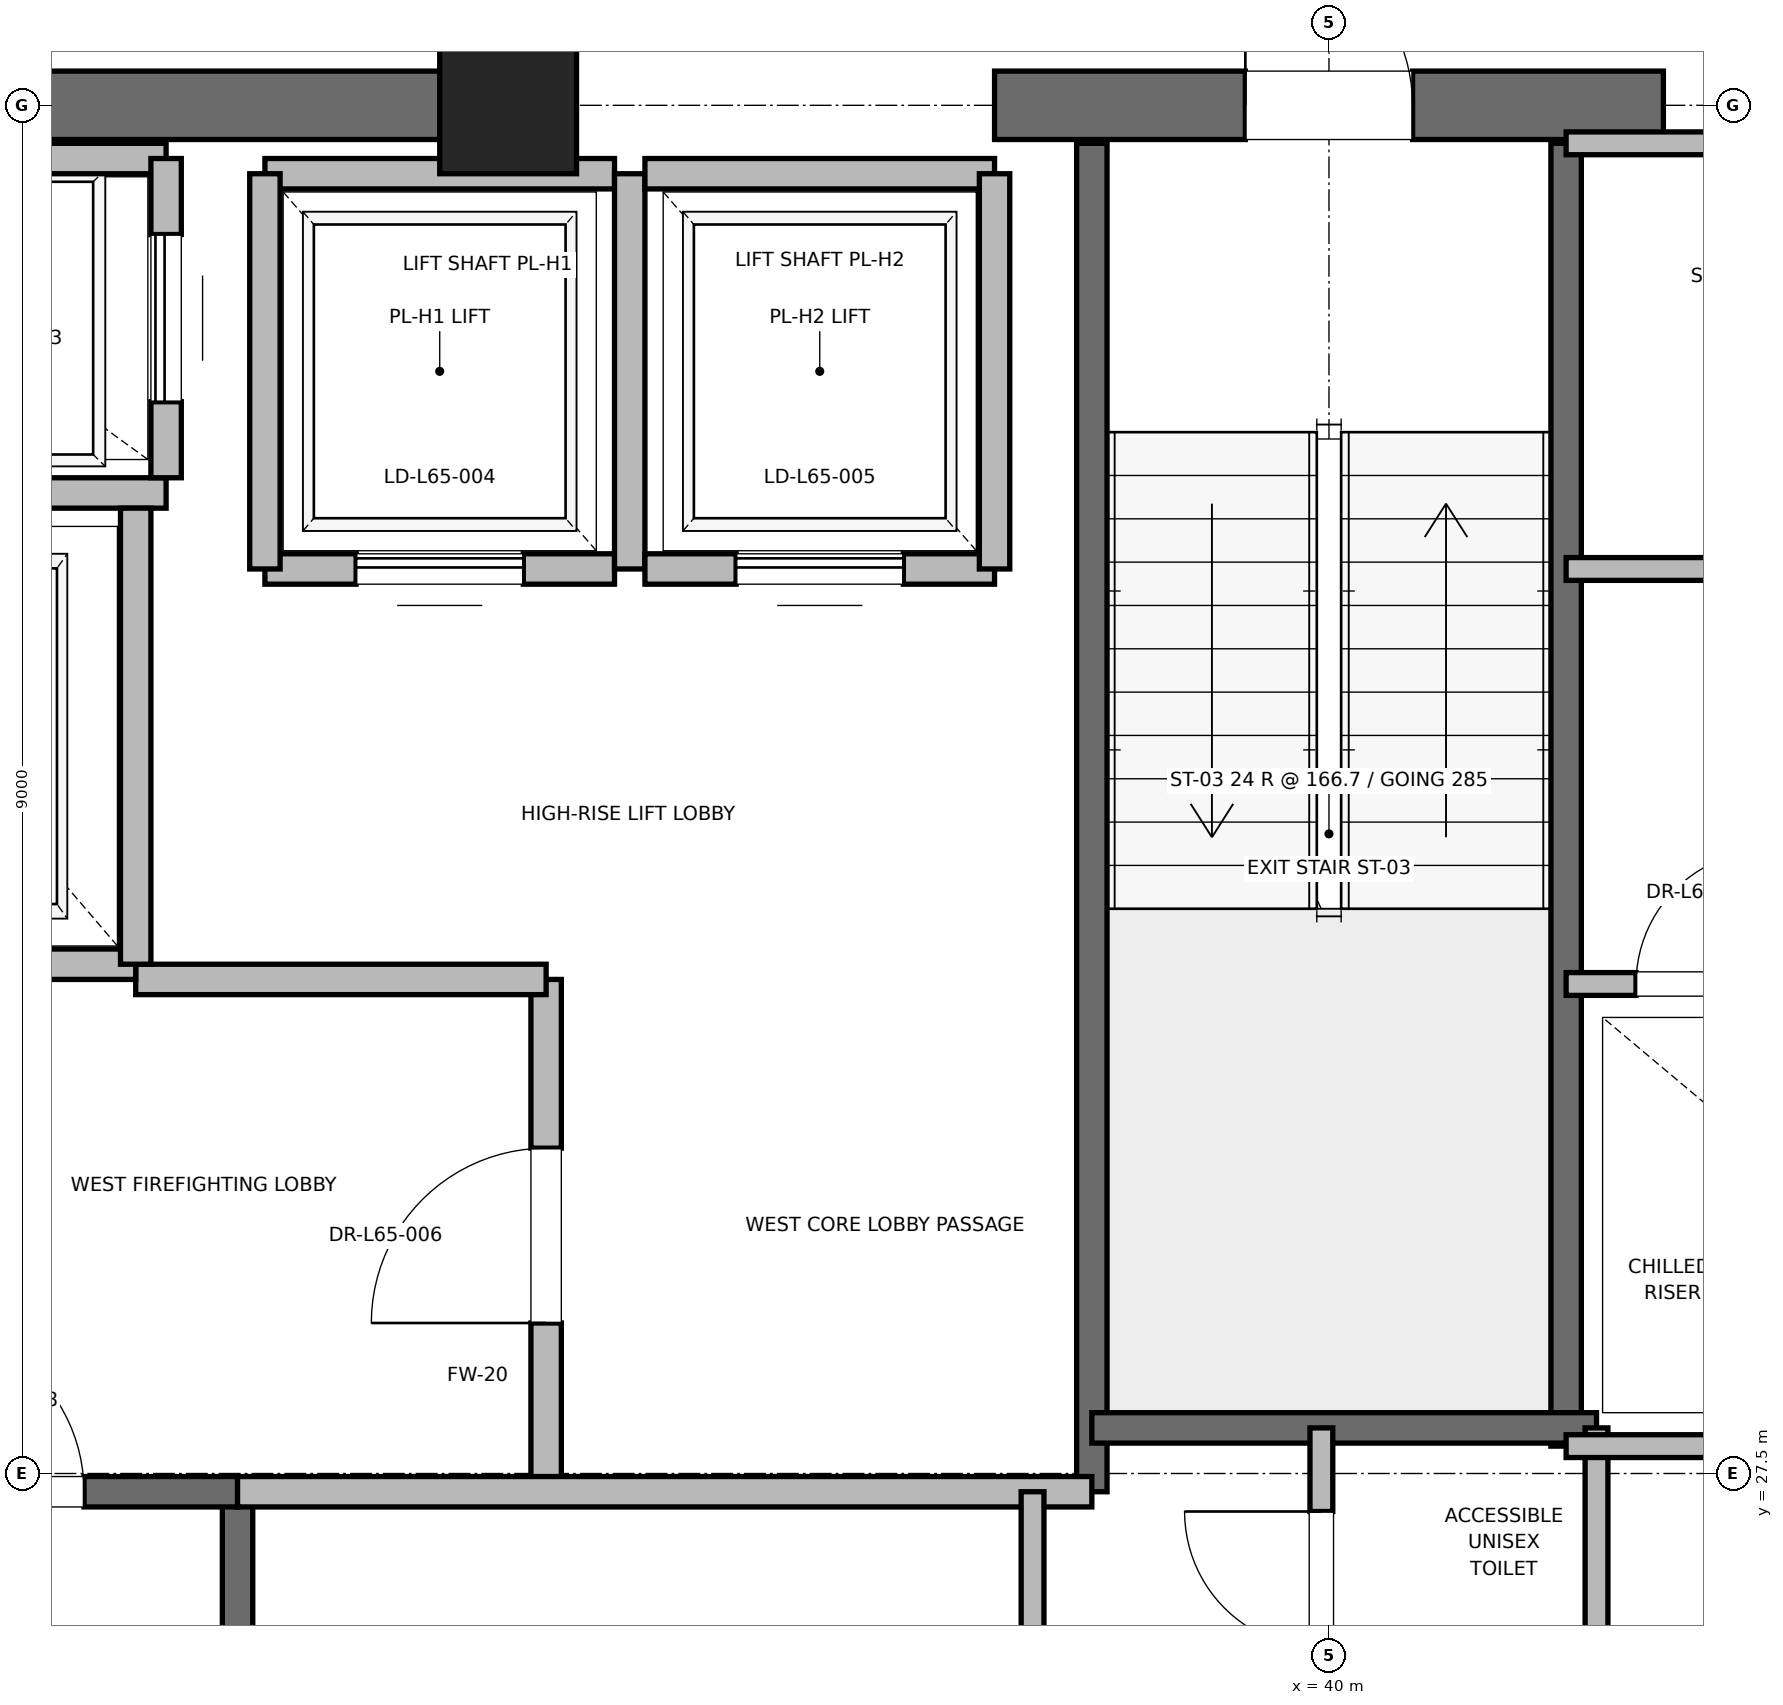
"""IFC4 building model, lengths in metres.
Left out: names, types, materials, properties, quantities, classifications, styles, units other than length and angle.
Written with IfcOpenShell. Run it as: python <this file> out.ifc"""

import sys

from ifc_helpers import new_model, si_unit, direction, frame, frame_2d, origin, origin_2d, place, context, subcontext, project, spatial, rectangle, extrude, element, fill, save


model = new_model("IFC4")
c1 = context("Model", 3, precision=1e-05, world=origin(), true_north=direction((0.0, 1.0)))
c2 = subcontext(c1, "Body", "Model", "MODEL_VIEW")
j1 = project(units=[si_unit("LENGTHUNIT", "METRE"), si_unit("PLANEANGLEUNIT", "RADIAN")], contexts=[c1])
p1 = place(None, origin())
s1 = spatial("IfcSite", under=j1, at=p1, CompositionType="ELEMENT")
p2 = place(p1, origin())
s2 = spatial("IfcBuilding", under=s1, at=p2, CompositionType="ELEMENT")
p3 = place(p2, frame((0.0, 0.0, 279.2)))
s3 = spatial("IfcBuildingStorey", under=s2, at=p3, CompositionType="ELEMENT", Elevation=279.2)
p4 = place(p3, frame((34.6, 36.5, 0.0), z_axis=(0.0, 0.0, 1.0), x_axis=(1.0, 0.0, 0.0)))
e1 = element("IfcColumn", 1, at=p4, inside=s3, PredefinedType="PILASTER", context=c2, shape_type="SweptSolid", body=[
    extrude(rectangle(XDim=0.9, YDim=0.9, at=origin_2d()), origin(), (0.0, 0.0, 1.0), 4.0),
])
p5 = place(p3, frame((29.0, 36.5, 0.0), z_axis=(0.0, 0.0, 1.0), x_axis=(1.0, 0.0, 0.0)))
e2 = element("IfcWall", 2, at=p5, inside=s3, PredefinedType="SHEAR", context=c2, shape_type="SweptSolid", body=[
    extrude(rectangle(XDim=5.8, YDim=0.45, at=frame_2d((2.9, 0.0))), origin(), (0.0, 0.0, 1.0), 3.785),
])
p6 = place(p3, frame((37.8, 36.5, 0.0), z_axis=(0.0, 0.0, 1.0), x_axis=(1.0, 0.0, 0.0)))
e3 = element("IfcWall", 3, at=p6, inside=s3, PredefinedType="SHEAR", context=c2, shape_type="SweptSolid", body=[
    extrude(rectangle(XDim=4.4, YDim=0.45, at=frame_2d((2.2, 0.0))), origin(), (0.0, 0.0, 1.0), 3.785),
])
p7 = place(p6, frame((1.65, 0.0, 0.0)))
e4 = element("IfcOpeningElement", 4, at=p7, cuts=e3, PredefinedType="OPENING", context=c2, shape_type="SweptSolid", body=[
    extrude(rectangle(XDim=1.1, YDim=2.15, at=frame_2d((0.55, 1.075))), frame((0.0, 0.225, 0.0), z_axis=(0.0, -1.0, 0.0), x_axis=(1.0, 0.0, 0.0)), (0.0, 0.0, 1.0), 0.45),
])
p8 = place(p3, frame((32.82, 18.6, 0.0), z_axis=(0.0, 0.0, 1.0), x_axis=(0.0, 1.0, 0.0)))
e5 = element("IfcWall", 5, at=p8, inside=s3, PredefinedType="SOLIDWALL", context=c2, shape_type="SweptSolid", body=[
    extrude(rectangle(XDim=8.78, YDim=0.2, at=frame_2d((4.39, 0.0))), origin(), (0.0, 0.0, 1.0), 3.785),
])
p9 = place(p3, frame((29.7, 27.38, 0.0), z_axis=(0.0, 0.0, 1.0), x_axis=(1.0, 0.0, 0.0)))
e6 = element("IfcWall", 6, at=p9, inside=s3, PredefinedType="SOLIDWALL", context=c2, shape_type="SweptSolid", body=[
    extrude(rectangle(XDim=3.12, YDim=0.2, at=frame_2d((1.56, 0.0))), origin(), (0.0, 0.0, 1.0), 3.785),
])
p10 = place(p9, frame((1.01, 0.0, 0.0)))
e7 = element("IfcOpeningElement", 7, at=p10, cuts=e6, PredefinedType="OPENING", context=c2, shape_type="SweptSolid", body=[
    extrude(rectangle(XDim=1.1, YDim=2.15, at=frame_2d((0.55, 1.075))), frame((0.0, 0.1, 0.0), z_axis=(0.0, -1.0, 0.0), x_axis=(1.0, 0.0, 0.0)), (0.0, 0.0, 1.0), 0.2),
])
p11 = place(p3, frame((38.44, 27.38, 0.0), z_axis=(0.0, 0.0, 1.0), x_axis=(0.0, 1.0, 0.0)))
e8 = element("IfcWall", 8, at=p11, inside=s3, PredefinedType="SOLIDWALL", context=c2, shape_type="SweptSolid", body=[
    extrude(rectangle(XDim=8.87, YDim=0.2, at=frame_2d((4.435, 0.0))), origin(), (0.0, 0.0, 1.0), 3.785),
])
p12 = place(p3, frame((41.56, 27.68, 0.0), z_axis=(0.0, 0.0, 1.0), x_axis=(0.0, 1.0, 0.0)))
e9 = element("IfcWall", 9, at=p12, inside=s3, PredefinedType="SOLIDWALL", context=c2, shape_type="SweptSolid", body=[
    extrude(rectangle(XDim=8.57, YDim=0.2, at=frame_2d((4.285, 0.0))), origin(), (0.0, 0.0, 1.0), 3.785),
])
p13 = place(p3, frame((38.44, 27.8, 0.0), z_axis=(0.0, 0.0, 1.0), x_axis=(1.0, 0.0, 0.0)))
e10 = element("IfcWall", 10, at=p13, inside=s3, PredefinedType="SOLIDWALL", context=c2, shape_type="SweptSolid", body=[
    extrude(rectangle(XDim=3.32, YDim=0.2, at=frame_2d((1.66, 0.0))), origin(), (0.0, 0.0, 1.0), 3.785),
])
p14 = place(p3, frame((34.85, 27.38, 0.0), z_axis=(0.0, 0.0, 1.0), x_axis=(0.0, 1.0, 0.0)))
e11 = element("IfcWall", 11, at=p14, inside=s3, PredefinedType="PARTITIONING", context=c2, shape_type="SweptSolid", body=[
    extrude(rectangle(XDim=3.37, YDim=0.2, at=frame_2d((1.685, 0.0))), origin(), (0.0, 0.0, 1.0), 3.785),
])
p15 = place(p14, frame((1.11, 0.0, 0.0)))
e12 = element("IfcOpeningElement", 12, at=p15, cuts=e11, PredefinedType="OPENING", context=c2, shape_type="SweptSolid", body=[
    extrude(rectangle(XDim=1.15, YDim=2.2, at=frame_2d((0.575, 1.1))), frame((0.0, 0.1, 0.0), z_axis=(0.0, -1.0, 0.0), x_axis=(1.0, 0.0, 0.0)), (0.0, 0.0, 1.0), 0.2),
])
p16 = place(p3, frame((32.82, 27.38, 0.0), z_axis=(0.0, 0.0, 1.0), x_axis=(1.0, 0.0, 0.0)))
e13 = element("IfcWall", 13, at=p16, inside=s3, PredefinedType="PARTITIONING", context=c2, shape_type="SweptSolid", body=[
    extrude(rectangle(XDim=5.62, YDim=0.2, at=frame_2d((2.81, 0.0))), origin(), (0.0, 0.0, 1.0), 3.785),
])
p17 = place(p3, frame((32.15, 30.75, 0.0), z_axis=(0.0, 0.0, 1.0), x_axis=(1.0, 0.0, 0.0)))
e14 = element("IfcWall", 14, at=p17, inside=s3, PredefinedType="PARTITIONING", context=c2, shape_type="SweptSolid", body=[
    extrude(rectangle(XDim=2.7, YDim=0.2, at=frame_2d((1.35, 0.0))), origin(), (0.0, 0.0, 1.0), 3.785),
])
p18 = place(p3, frame((29.55, 30.85, 0.0), z_axis=(0.0, 0.0, 1.0), x_axis=(1.0, 0.0, 0.0)))
e15 = element("IfcWall", 15, at=p18, inside=s3, PredefinedType="SOLIDWALL", context=c2, shape_type="SweptSolid", body=[
    extrude(rectangle(XDim=2.6, YDim=0.2, at=frame_2d((1.3, 0.0))), origin(), (0.0, 0.0, 1.0), 2.865),
])
p19 = place(p18, frame((0.75, 0.0, 0.0)))
e16 = element("IfcOpeningElement", 16, at=p19, cuts=e15, PredefinedType="OPENING", context=c2, shape_type="SweptSolid", body=[
    extrude(rectangle(XDim=1.1, YDim=2.2, at=frame_2d((0.55, 1.1))), frame((0.0, 0.1, 0.0), z_axis=(0.0, -1.0, 0.0), x_axis=(1.0, 0.0, 0.0)), (0.0, 0.0, 1.0), 0.2),
])
p20 = place(p3, frame((29.55, 33.95, 0.0), z_axis=(0.0, 0.0, 1.0), x_axis=(1.0, 0.0, 0.0)))
e17 = element("IfcWall", 17, at=p20, inside=s3, PredefinedType="SOLIDWALL", context=c2, shape_type="SweptSolid", body=[
    extrude(rectangle(XDim=2.8, YDim=0.2, at=frame_2d((1.4, 0.0))), origin(), (0.0, 0.0, 1.0), 3.785),
])
p21 = place(p3, frame((32.15, 30.85, 0.0), z_axis=(0.0, 0.0, 1.0), x_axis=(0.0, 1.0, 0.0)))
e18 = element("IfcWall", 18, at=p21, inside=s3, PredefinedType="SOLIDWALL", context=c2, shape_type="SweptSolid", body=[
    extrude(rectangle(XDim=3.0, YDim=0.2, at=frame_2d((1.5, 0.0))), origin(), (0.0, 0.0, 1.0), 3.785),
])
p22 = place(p3, frame((32.35, 36.15, 0.0), z_axis=(0.0, 0.0, 1.0), x_axis=(-1.0, 0.0, 0.0)))
e19 = element("IfcWall", 19, at=p22, inside=s3, PredefinedType="SOLIDWALL", context=c2, shape_type="SweptSolid", body=[
    extrude(rectangle(XDim=2.8, YDim=0.2, at=frame_2d((1.4, 0.0))), origin(), (0.0, 0.0, 1.0), 3.148),
])
p23 = place(p3, frame((32.35, 34.05, 0.0), z_axis=(0.0, 0.0, 1.0), x_axis=(0.0, 1.0, 0.0)))
e20 = element("IfcWall", 20, at=p23, inside=s3, PredefinedType="SOLIDWALL", context=c2, shape_type="SweptSolid", body=[
    extrude(rectangle(XDim=2.1, YDim=0.2, at=frame_2d((1.05, 0.0))), origin(), (0.0, 0.0, 1.0), 3.785),
])
p24 = place(p23, frame((0.5, 0.0, 0.0)))
e21 = element("IfcOpeningElement", 21, at=p24, cuts=e20, PredefinedType="OPENING", context=c2, shape_type="SweptSolid", body=[
    extrude(rectangle(XDim=1.1, YDim=2.2, at=frame_2d((0.55, 1.1))), frame((0.0, 0.1, 0.0), z_axis=(0.0, -1.0, 0.0), x_axis=(1.0, 0.0, 0.0)), (0.0, 0.0, 1.0), 0.2),
])
p25 = place(p3, frame((33.0, 33.45, 0.0), z_axis=(0.0, 0.0, 1.0), x_axis=(1.0, 0.0, 0.0)))
e22 = element("IfcWall", 22, at=p25, inside=s3, PredefinedType="SOLIDWALL", context=c2, shape_type="SweptSolid", body=[
    extrude(rectangle(XDim=2.3, YDim=0.2, at=frame_2d((1.15, 0.0))), origin(), (0.0, 0.0, 1.0), 3.785),
])
p26 = place(p25, frame((0.6, 0.0, 0.0)))
e23 = element("IfcOpeningElement", 23, at=p26, cuts=e22, PredefinedType="OPENING", context=c2, shape_type="SweptSolid", body=[
    extrude(rectangle(XDim=1.1, YDim=2.2, at=frame_2d((0.55, 1.1))), frame((0.0, 0.1, 0.0), z_axis=(0.0, -1.0, 0.0), x_axis=(1.0, 0.0, 0.0)), (0.0, 0.0, 1.0), 0.2),
])
p27 = place(p3, frame((35.3, 36.05, 0.0), z_axis=(0.0, 0.0, 1.0), x_axis=(-1.0, 0.0, 0.0)))
e24 = element("IfcWall", 24, at=p27, inside=s3, PredefinedType="SOLIDWALL", context=c2, shape_type="SweptSolid", body=[
    extrude(rectangle(XDim=2.3, YDim=0.2, at=frame_2d((1.15, 0.0))), origin(), (0.0, 0.0, 1.0), 2.865),
])
p28 = place(p3, frame((33.0, 36.05, 0.0), z_axis=(0.0, 0.0, 1.0), x_axis=(0.0, -1.0, 0.0)))
e25 = element("IfcWall", 25, at=p28, inside=s3, PredefinedType="SOLIDWALL", context=c2, shape_type="SweptSolid", body=[
    extrude(rectangle(XDim=2.6, YDim=0.2, at=frame_2d((1.3, 0.0))), origin(), (0.0, 0.0, 1.0), 3.785),
])
p29 = place(p3, frame((35.4, 33.45, 0.0), z_axis=(0.0, 0.0, 1.0), x_axis=(0.0, 1.0, 0.0)))
e26 = element("IfcWall", 26, at=p29, inside=s3, PredefinedType="SOLIDWALL", context=c2, shape_type="SweptSolid", body=[
    extrude(rectangle(XDim=2.6, YDim=0.2, at=frame_2d((1.3, 0.0))), origin(), (0.0, 0.0, 1.0), 2.865),
])
p30 = place(p3, frame((35.5, 33.45, 0.0), z_axis=(0.0, 0.0, 1.0), x_axis=(1.0, 0.0, 0.0)))
e27 = element("IfcWall", 27, at=p30, inside=s3, PredefinedType="SOLIDWALL", context=c2, shape_type="SweptSolid", body=[
    extrude(rectangle(XDim=2.3, YDim=0.2, at=frame_2d((1.15, 0.0))), origin(), (0.0, 0.0, 1.0), 3.785),
])
p31 = place(p30, frame((0.6, 0.0, 0.0)))
e28 = element("IfcOpeningElement", 28, at=p31, cuts=e27, PredefinedType="OPENING", context=c2, shape_type="SweptSolid", body=[
    extrude(rectangle(XDim=1.1, YDim=2.2, at=frame_2d((0.55, 1.1))), frame((0.0, 0.1, 0.0), z_axis=(0.0, -1.0, 0.0), x_axis=(1.0, 0.0, 0.0)), (0.0, 0.0, 1.0), 0.2),
])
p32 = place(p3, frame((37.8, 36.05, 0.0), z_axis=(0.0, 0.0, 1.0), x_axis=(-1.0, 0.0, 0.0)))
e29 = element("IfcWall", 29, at=p32, inside=s3, PredefinedType="SOLIDWALL", context=c2, shape_type="SweptSolid", body=[
    extrude(rectangle(XDim=2.3, YDim=0.2, at=frame_2d((1.15, 0.0))), origin(), (0.0, 0.0, 1.0), 2.865),
])
p33 = place(p3, frame((37.8, 33.45, 0.0), z_axis=(0.0, 0.0, 1.0), x_axis=(0.0, 1.0, 0.0)))
e30 = element("IfcWall", 30, at=p33, inside=s3, PredefinedType="SOLIDWALL", context=c2, shape_type="SweptSolid", body=[
    extrude(rectangle(XDim=2.6, YDim=0.2, at=frame_2d((1.3, 0.0))), origin(), (0.0, 0.0, 1.0), 2.865),
])
p34 = place(p3, frame((41.76, 23.8, 0.0), z_axis=(0.0, 0.0, 1.0), x_axis=(0.0, 1.0, 0.0)))
e31 = element("IfcWall", 31, at=p34, inside=s3, PredefinedType="PARTITIONING", context=c2, shape_type="SweptSolid", body=[
    extrude(rectangle(XDim=4.0, YDim=0.15, at=frame_2d((2.0, 0.0))), origin(), (0.0, 0.0, 1.0), 2.85),
])
p35 = place(p3, frame((39.95, 25.8, 0.0), z_axis=(0.0, 0.0, 1.0), x_axis=(0.0, 1.0, 0.0)))
e32 = element("IfcWall", 32, at=p35, inside=s3, PredefinedType="PARTITIONING", context=c2, shape_type="SweptSolid", body=[
    extrude(rectangle(XDim=2.0, YDim=0.15, at=frame_2d((1.0, 0.0))), origin(), (0.0, 0.0, 1.0), 2.85),
])
p36 = place(p35, frame((0.55, 0.0, 0.0)))
e33 = element("IfcOpeningElement", 33, at=p36, cuts=e32, PredefinedType="OPENING", context=c2, shape_type="SweptSolid", body=[
    extrude(rectangle(XDim=0.9, YDim=2.1, at=frame_2d((0.45, 1.05))), frame((0.0, 0.075, 0.0), z_axis=(0.0, -1.0, 0.0), x_axis=(1.0, 0.0, 0.0)), (0.0, 0.0, 1.0), 0.15),
])
p37 = place(p3, frame((38.05, 23.06, 0.0), z_axis=(0.0, 0.0, 1.0), x_axis=(0.0, 1.0, 0.0)))
e34 = element("IfcWall", 34, at=p37, inside=s3, PredefinedType="PARTITIONING", context=c2, shape_type="SweptSolid", body=[
    extrude(rectangle(XDim=4.32, YDim=0.15, at=frame_2d((2.16, 0.0))), origin(), (0.0, 0.0, 1.0), 2.85),
])
p38 = place(p37, frame((1.66, 0.0, 0.0)))
e35 = element("IfcOpeningElement", 35, at=p38, cuts=e34, PredefinedType="OPENING", context=c2, shape_type="SweptSolid", body=[
    extrude(rectangle(XDim=1.0, YDim=2.15, at=frame_2d((0.5, 1.075))), frame((0.0, 0.075, 0.0), z_axis=(0.0, -1.0, 0.0), x_axis=(1.0, 0.0, 0.0)), (0.0, 0.0, 1.0), 0.15),
])
p39 = place(p3, frame((41.56, 27.68, 0.0), z_axis=(0.0, 0.0, 1.0), x_axis=(1.0, 0.0, 0.0)))
e36 = element("IfcWall", 36, at=p39, inside=s3, PredefinedType="PARTITIONING", context=c2, shape_type="SweptSolid", body=[
    extrude(rectangle(XDim=3.59, YDim=0.15, at=frame_2d((1.795, 0.0))), origin(), (0.0, 0.0, 1.0), 2.85),
])
p40 = place(p3, frame((41.56, 30.72, 0.0), z_axis=(0.0, 0.0, 1.0), x_axis=(1.0, 0.0, 0.0)))
e37 = element("IfcWall", 37, at=p40, inside=s3, PredefinedType="PARTITIONING", context=c2, shape_type="SweptSolid", body=[
    extrude(rectangle(XDim=1.8, YDim=0.15, at=frame_2d((0.9, 0.0))), origin(), (0.0, 0.0, 1.0), 2.85),
])
p41 = place(p40, frame((0.46, 0.0, 0.0)))
e38 = element("IfcOpeningElement", 38, at=p41, cuts=e37, PredefinedType="OPENING", context=c2, shape_type="SweptSolid", body=[
    extrude(rectangle(XDim=0.88, YDim=2.1, at=frame_2d((0.44, 1.05))), frame((0.0, 0.075, 0.0), z_axis=(0.0, -1.0, 0.0), x_axis=(1.0, 0.0, 0.0)), (0.0, 0.0, 1.0), 0.15),
])
p42 = place(p3, frame((41.56, 36.25, 0.0), z_axis=(0.0, 0.0, 1.0), x_axis=(1.0, 0.0, 0.0)))
e39 = element("IfcWall", 39, at=p42, inside=s3, PredefinedType="PARTITIONING", context=c2, shape_type="SweptSolid", body=[
    extrude(rectangle(XDim=2.94, YDim=0.15, at=frame_2d((1.47, 0.0))), origin(), (0.0, 0.0, 1.0), 2.85),
])
p43 = place(p3, frame((41.56, 33.45, 0.0), z_axis=(0.0, 0.0, 1.0), x_axis=(1.0, 0.0, 0.0)))
e40 = element("IfcWall", 40, at=p43, inside=s3, PredefinedType="PARTITIONING", context=c2, shape_type="SweptSolid", body=[
    extrude(rectangle(XDim=2.94, YDim=0.15, at=frame_2d((1.47, 0.0))), origin(), (0.0, 0.0, 1.0), 2.85),
])
p44 = place(p43, frame((1.03, 0.0, 0.0)))
e41 = element("IfcOpeningElement", 41, at=p44, cuts=e40, PredefinedType="OPENING", context=c2, shape_type="SweptSolid", body=[
    extrude(rectangle(XDim=0.88, YDim=2.1, at=frame_2d((0.44, 1.05))), frame((0.0, 0.075, 0.0), z_axis=(0.0, -1.0, 0.0), x_axis=(1.0, 0.0, 0.0)), (0.0, 0.0, 1.0), 0.15),
])
p45 = place(p10, origin())
e42 = element("IfcDoor", 42, at=p45, inside=s3, OperationType="SINGLE_SWING_LEFT", PredefinedType="DOOR", context=c2, shape_type="SweptSolid", body=[
    extrude(rectangle(XDim=1.1, YDim=2.15, at=frame_2d((0.55, 1.075))), frame((0.0, 0.025, 0.0), z_axis=(0.0, -1.0, 0.0), x_axis=(1.0, 0.0, 0.0)), (0.0, 0.0, 1.0), 0.05),
])
fill(e7, e42)
p46 = place(p7, origin())
e43 = element("IfcDoor", 43, at=p46, inside=s3, OperationType="SINGLE_SWING_LEFT", PredefinedType="DOOR", context=c2, shape_type="SweptSolid", body=[
    extrude(rectangle(XDim=1.1, YDim=2.15, at=frame_2d((0.55, 1.075))), frame((0.0, 0.025, 0.0), z_axis=(0.0, -1.0, 0.0), x_axis=(1.0, 0.0, 0.0)), (0.0, 0.0, 1.0), 0.05),
])
fill(e4, e43)
p47 = place(p15, origin())
e44 = element("IfcDoor", 44, at=p47, inside=s3, OperationType="SINGLE_SWING_LEFT", PredefinedType="DOOR", context=c2, shape_type="SweptSolid", body=[
    extrude(rectangle(XDim=1.15, YDim=2.2, at=frame_2d((0.575, 1.1))), frame((0.0, 0.025, 0.0), z_axis=(0.0, -1.0, 0.0), x_axis=(1.0, 0.0, 0.0)), (0.0, 0.0, 1.0), 0.05),
])
fill(e12, e44)
p48 = place(p24, origin())
e45 = element("IfcDoor", 45, at=p48, inside=s3, OperationType="SLIDING_TO_RIGHT", PredefinedType="DOOR", context=c2, shape_type="SweptSolid", body=[
    extrude(rectangle(XDim=1.1, YDim=2.2, at=frame_2d((0.55, 1.1))), frame((0.0, 0.025, 0.0), z_axis=(0.0, -1.0, 0.0), x_axis=(1.0, 0.0, 0.0)), (0.0, 0.0, 1.0), 0.05),
])
fill(e21, e45)
p49 = place(p26, origin())
e46 = element("IfcDoor", 46, at=p49, inside=s3, OperationType="SLIDING_TO_RIGHT", PredefinedType="DOOR", context=c2, shape_type="SweptSolid", body=[
    extrude(rectangle(XDim=1.1, YDim=2.2, at=frame_2d((0.55, 1.1))), frame((0.0, 0.025, 0.0), z_axis=(0.0, -1.0, 0.0), x_axis=(1.0, 0.0, 0.0)), (0.0, 0.0, 1.0), 0.05),
])
fill(e23, e46)
p50 = place(p31, origin())
e47 = element("IfcDoor", 47, at=p50, inside=s3, OperationType="SLIDING_TO_RIGHT", PredefinedType="DOOR", context=c2, shape_type="SweptSolid", body=[
    extrude(rectangle(XDim=1.1, YDim=2.2, at=frame_2d((0.55, 1.1))), frame((0.0, 0.025, 0.0), z_axis=(0.0, -1.0, 0.0), x_axis=(1.0, 0.0, 0.0)), (0.0, 0.0, 1.0), 0.05),
])
fill(e28, e47)
p51 = place(p36, origin())
e48 = element("IfcDoor", 48, at=p51, inside=s3, OperationType="SINGLE_SWING_RIGHT", PredefinedType="DOOR", context=c2, shape_type="SweptSolid", body=[
    extrude(rectangle(XDim=0.9, YDim=2.1, at=frame_2d((0.45, 1.05))), frame((0.0, 0.025, 0.0), z_axis=(0.0, -1.0, 0.0), x_axis=(1.0, 0.0, 0.0)), (0.0, 0.0, 1.0), 0.05),
])
fill(e33, e48)
p52 = place(p41, origin())
e49 = element("IfcDoor", 49, at=p52, inside=s3, OperationType="SINGLE_SWING_RIGHT", PredefinedType="DOOR", context=c2, shape_type="SweptSolid", body=[
    extrude(rectangle(XDim=0.88, YDim=2.1, at=frame_2d((0.44, 1.05))), frame((0.0, 0.025, 0.0), z_axis=(0.0, -1.0, 0.0), x_axis=(1.0, 0.0, 0.0)), (0.0, 0.0, 1.0), 0.05),
])
fill(e38, e49)
save(model, sys.argv[1])
